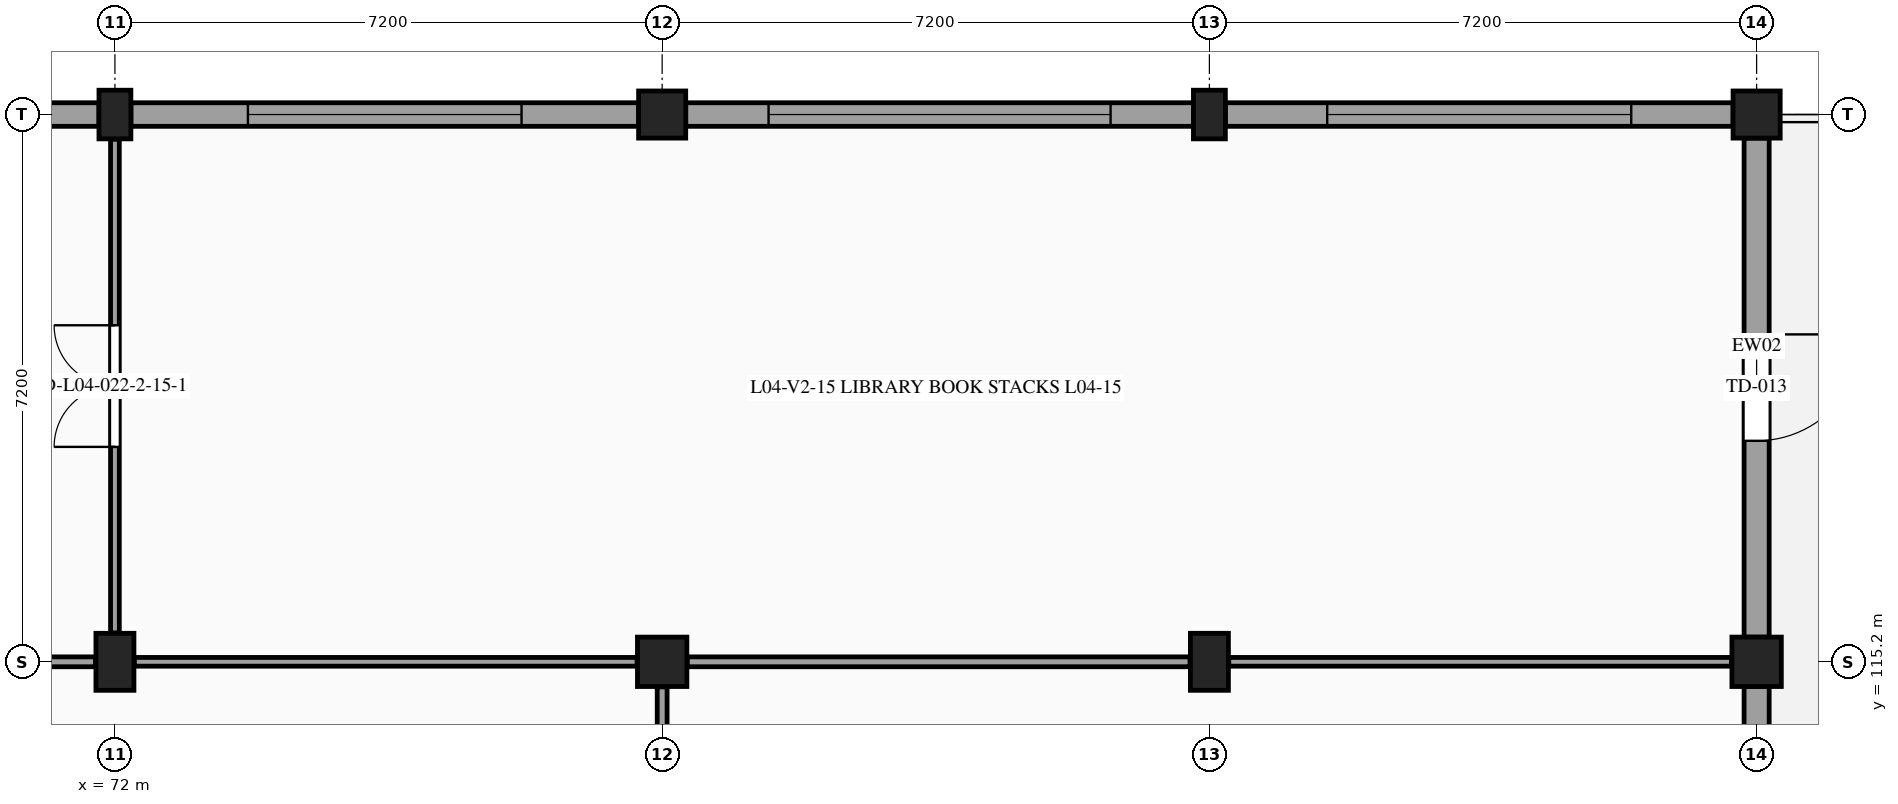
"""IFC4 building model, lengths in metres.
Left out: names, types, materials, properties, quantities, classifications, styles, units other than length and angle.
Written with IfcOpenShell. Run it as: python <this file> out.ifc"""

import sys

from ifc_helpers import new_model, si_unit, direction, frame, frame_2d, origin, origin_2d, place, context, subcontext, project, spatial, rectangle, extrude, element, fill, save


model = new_model("IFC4")
c1 = context("Model", 3, precision=1e-05, world=origin(), true_north=direction((0.0, 1.0)))
c2 = subcontext(c1, "Body", "Model", "MODEL_VIEW")
j1 = project(units=[si_unit("LENGTHUNIT", "METRE"), si_unit("PLANEANGLEUNIT", "RADIAN")], contexts=[c1])
p1 = place(None, origin())
s1 = spatial("IfcSite", under=j1, at=p1, CompositionType="ELEMENT")
p2 = place(p1, origin())
s2 = spatial("IfcBuilding", under=s1, at=p2, CompositionType="ELEMENT")
p3 = place(p2, frame((0.0, 0.0, 18.6)))
s3 = spatial("IfcBuildingStorey", under=s2, at=p3, CompositionType="ELEMENT", Elevation=18.6)
p4 = place(p3, frame((72.0, 115.2, 0.0), z_axis=(0.0, 0.0, 1.0), x_axis=(1.0, 0.0, 0.0)))
e1 = element("IfcColumn", 1, at=p4, inside=s3, PredefinedType="COLUMN", context=c2, shape_type="SweptSolid", body=[
    extrude(rectangle(XDim=0.5, YDim=0.75, at=origin_2d()), origin(), (0.0, 0.0, 1.0), 4.2),
])
p5 = place(p3, frame((72.0, 122.4, 0.0), z_axis=(0.0, 0.0, 1.0), x_axis=(1.0, 0.0, 0.0)))
e2 = element("IfcColumn", 2, at=p5, inside=s3, PredefinedType="PILASTER", context=c2, shape_type="SweptSolid", body=[
    extrude(rectangle(XDim=0.42, YDim=0.64, at=origin_2d()), origin(), (0.0, 0.0, 1.0), 4.2),
])
p6 = place(p3, frame((79.2, 115.2, 0.0), z_axis=(0.0, 0.0, 1.0), x_axis=(1.0, 0.0, 0.0)))
e3 = element("IfcColumn", 3, at=p6, inside=s3, PredefinedType="COLUMN", context=c2, shape_type="SweptSolid", body=[
    extrude(rectangle(XDim=0.65, YDim=0.65, at=origin_2d()), origin(), (0.0, 0.0, 1.0), 4.2),
])
p7 = place(p3, frame((79.2, 122.4, 0.0), z_axis=(0.0, 0.0, 1.0), x_axis=(1.0, 0.0, 0.0)))
e4 = element("IfcColumn", 4, at=p7, inside=s3, PredefinedType="COLUMN", context=c2, shape_type="SweptSolid", body=[
    extrude(rectangle(XDim=0.62, YDim=0.62, at=origin_2d()), origin(), (0.0, 0.0, 1.0), 4.2),
])
p8 = place(p3, frame((86.4, 115.2, 0.0), z_axis=(0.0, 0.0, 1.0), x_axis=(1.0, 0.0, 0.0)))
e5 = element("IfcColumn", 5, at=p8, inside=s3, PredefinedType="COLUMN", context=c2, shape_type="SweptSolid", body=[
    extrude(rectangle(XDim=0.5, YDim=0.75, at=origin_2d()), origin(), (0.0, 0.0, 1.0), 4.2),
])
p9 = place(p3, frame((86.4, 122.4, 0.0), z_axis=(0.0, 0.0, 1.0), x_axis=(1.0, 0.0, 0.0)))
e6 = element("IfcColumn", 6, at=p9, inside=s3, PredefinedType="PILASTER", context=c2, shape_type="SweptSolid", body=[
    extrude(rectangle(XDim=0.42, YDim=0.64, at=origin_2d()), origin(), (0.0, 0.0, 1.0), 4.2),
])
p10 = place(p3, frame((93.6, 115.2, 0.0), z_axis=(0.0, 0.0, 1.0), x_axis=(1.0, 0.0, 0.0)))
e7 = element("IfcColumn", 7, at=p10, inside=s3, PredefinedType="COLUMN", context=c2, shape_type="SweptSolid", body=[
    extrude(rectangle(XDim=0.65, YDim=0.65, at=origin_2d()), origin(), (0.0, 0.0, 1.0), 4.2),
])
p11 = place(p3, frame((93.6, 122.4, 0.0), z_axis=(0.0, 0.0, 1.0), x_axis=(1.0, 0.0, 0.0)))
e8 = element("IfcColumn", 8, at=p11, inside=s3, PredefinedType="COLUMN", context=c2, shape_type="SweptSolid", body=[
    extrude(rectangle(XDim=0.62, YDim=0.62, at=origin_2d()), origin(), (0.0, 0.0, 1.0), 4.2),
])
p12 = place(p3, frame((65.11, 122.4, 0.0), z_axis=(0.0, 0.0, 1.0), x_axis=(1.0, 0.0, 0.0)))
e9 = element("IfcWall", 9, at=p12, inside=s3, PredefinedType="STANDARD", context=c2, shape_type="SweptSolid", body=[
    extrude(rectangle(XDim=6.68, YDim=0.31, at=frame_2d((3.34, 0.0))), origin(), (0.0, 0.0, 1.0), 3.2),
])
p13 = place(p12, frame((0.94, 0.0, 0.98)))
e10 = element("IfcOpeningElement", 10, at=p13, cuts=e9, PredefinedType="OPENING", context=c2, shape_type="SweptSolid", body=[
    extrude(rectangle(XDim=4.8, YDim=1.8, at=frame_2d((2.4, 0.9))), frame((0.0, 0.165, 0.0), z_axis=(0.0, -1.0, 0.0), x_axis=(1.0, 0.0, 0.0)), (0.0, 0.0, 1.0), 0.33),
])
p14 = place(p3, frame((72.21, 122.4, 0.0), z_axis=(0.0, 0.0, 1.0), x_axis=(1.0, 0.0, 0.0)))
e11 = element("IfcWall", 11, at=p14, inside=s3, PredefinedType="STANDARD", context=c2, shape_type="SweptSolid", body=[
    extrude(rectangle(XDim=6.68, YDim=0.31, at=frame_2d((3.34, 0.0))), origin(), (0.0, 0.0, 1.0), 3.18),
])
p15 = place(p14, frame((1.54, 0.0, 0.98)))
e12 = element("IfcOpeningElement", 12, at=p15, cuts=e11, PredefinedType="OPENING", context=c2, shape_type="SweptSolid", body=[
    extrude(rectangle(XDim=3.6, YDim=1.8, at=frame_2d((1.8, 0.9))), frame((0.0, 0.165, 0.0), z_axis=(0.0, -1.0, 0.0), x_axis=(1.0, 0.0, 0.0)), (0.0, 0.0, 1.0), 0.33),
])
p16 = place(p3, frame((79.51, 122.4, 0.0), z_axis=(0.0, 0.0, 1.0), x_axis=(1.0, 0.0, 0.0)))
e13 = element("IfcWall", 13, at=p16, inside=s3, PredefinedType="STANDARD", context=c2, shape_type="SweptSolid", body=[
    extrude(rectangle(XDim=6.68, YDim=0.31, at=frame_2d((3.34, 0.0))), origin(), (0.0, 0.0, 1.0), 3.18),
])
p17 = place(p16, frame((1.09, 0.0, 0.98)))
e14 = element("IfcOpeningElement", 14, at=p17, cuts=e13, PredefinedType="OPENING", context=c2, shape_type="SweptSolid", body=[
    extrude(rectangle(XDim=4.5, YDim=1.55, at=frame_2d((2.25, 0.775))), frame((0.0, 0.165, 0.0), z_axis=(0.0, -1.0, 0.0), x_axis=(1.0, 0.0, 0.0)), (0.0, 0.0, 1.0), 0.33),
])
p18 = place(p3, frame((86.61, 122.4, 0.0), z_axis=(0.0, 0.0, 1.0), x_axis=(1.0, 0.0, 0.0)))
e15 = element("IfcWall", 15, at=p18, inside=s3, PredefinedType="STANDARD", context=c2, shape_type="SweptSolid", body=[
    extrude(rectangle(XDim=6.68, YDim=0.31, at=frame_2d((3.34, 0.0))), origin(), (0.0, 0.0, 1.0), 3.18),
])
p19 = place(p18, frame((1.34, 0.0, 0.98)))
e16 = element("IfcOpeningElement", 16, at=p19, cuts=e15, PredefinedType="OPENING", context=c2, shape_type="SweptSolid", body=[
    extrude(rectangle(XDim=4.0, YDim=1.55, at=frame_2d((2.0, 0.775))), frame((0.0, 0.165, 0.0), z_axis=(0.0, -1.0, 0.0), x_axis=(1.0, 0.0, 0.0)), (0.0, 0.0, 1.0), 0.33),
])
p20 = place(p3, frame((93.6, 122.09, 0.0), z_axis=(0.0, 0.0, 1.0), x_axis=(0.0, -1.0, 0.0)))
e17 = element("IfcWall", 17, at=p20, inside=s3, PredefinedType="STANDARD", context=c2, shape_type="SweptSolid", body=[
    extrude(rectangle(XDim=6.565, YDim=0.33, at=frame_2d((3.283, 0.0))), origin(), (0.0, 0.0, 1.0), 3.13),
])
p21 = place(p20, frame((2.583, 0.0, 0.0)))
e18 = element("IfcOpeningElement", 18, at=p21, cuts=e17, PredefinedType="OPENING", context=c2, shape_type="SweptSolid", body=[
    extrude(rectangle(XDim=1.4, YDim=2.25, at=frame_2d((0.7, 1.125))), frame((0.0, 0.175, 0.0), z_axis=(0.0, -1.0, 0.0), x_axis=(1.0, 0.0, 0.0)), (0.0, 0.0, 1.0), 0.35),
])
p22 = place(p3, frame((93.6, 114.875, 0.0), z_axis=(0.0, 0.0, 1.0), x_axis=(0.0, -1.0, 0.0)))
e19 = element("IfcWall", 19, at=p22, inside=s3, PredefinedType="STANDARD", context=c2, shape_type="SweptSolid", body=[
    extrude(rectangle(XDim=6.535, YDim=0.33, at=frame_2d((3.268, 0.0))), origin(), (0.0, 0.0, 1.0), 3.13),
])
p23 = place(p22, frame((2.718, 0.0, 0.0)))
e20 = element("IfcOpeningElement", 20, at=p23, cuts=e19, PredefinedType="OPENING", context=c2, shape_type="SweptSolid", body=[
    extrude(rectangle(XDim=1.1, YDim=2.2, at=frame_2d((0.55, 1.1))), frame((0.0, 0.175, 0.0), z_axis=(0.0, -1.0, 0.0), x_axis=(1.0, 0.0, 0.0)), (0.0, 0.0, 1.0), 0.35),
])
p24 = place(p3, frame((65.13, 115.2, 0.0), z_axis=(0.0, 0.0, 1.0), x_axis=(1.0, 0.0, 0.0)))
e21 = element("IfcWall", 21, at=p24, inside=s3, PredefinedType="PARTITIONING", context=c2, shape_type="SweptSolid", body=[
    extrude(rectangle(XDim=6.615, YDim=0.13, at=frame_2d((3.308, 0.0))), origin(), (0.0, 0.0, 1.0), 3.23),
])
p25 = place(p3, frame((72.0, 115.58, 0.0), z_axis=(0.0, 0.0, 1.0), x_axis=(0.0, 1.0, 0.0)))
e22 = element("IfcWall", 22, at=p25, inside=s3, PredefinedType="PARTITIONING", context=c2, shape_type="SweptSolid", body=[
    extrude(rectangle(XDim=6.495, YDim=0.115, at=frame_2d((3.248, 0.0))), origin(), (0.0, 0.0, 1.0), 3.305),
])
p26 = place(p25, frame((2.448, 0.0, 0.0)))
e23 = element("IfcOpeningElement", 23, at=p26, cuts=e22, PredefinedType="OPENING", context=c2, shape_type="SweptSolid", body=[
    extrude(rectangle(XDim=1.6, YDim=2.2, at=frame_2d((0.8, 1.1))), frame((0.0, 0.067, 0.0), z_axis=(0.0, -1.0, 0.0), x_axis=(1.0, 0.0, 0.0)), (0.0, 0.0, 1.0), 0.135),
])
p27 = place(p3, frame((79.2, 108.345, 0.0), z_axis=(0.0, 0.0, 1.0), x_axis=(0.0, 1.0, 0.0)))
e24 = element("IfcWall", 24, at=p27, inside=s3, PredefinedType="PARTITIONING", context=c2, shape_type="SweptSolid", body=[
    extrude(rectangle(XDim=6.525, YDim=0.13, at=frame_2d((3.263, 0.0))), origin(), (0.0, 0.0, 1.0), 3.24),
])
p28 = place(p27, frame((2.788, 0.0, 0.0)))
e25 = element("IfcOpeningElement", 25, at=p28, cuts=e24, PredefinedType="OPENING", context=c2, shape_type="SweptSolid", body=[
    extrude(rectangle(XDim=0.95, YDim=2.15, at=frame_2d((0.475, 1.075))), frame((0.0, 0.075, 0.0), z_axis=(0.0, -1.0, 0.0), x_axis=(1.0, 0.0, 0.0)), (0.0, 0.0, 1.0), 0.15),
])
p29 = place(p3, frame((72.255, 115.2, 0.0), z_axis=(0.0, 0.0, 1.0), x_axis=(1.0, 0.0, 0.0)))
e26 = element("IfcWall", 26, at=p29, inside=s3, PredefinedType="PARTITIONING", context=c2, shape_type="SweptSolid", body=[
    extrude(rectangle(XDim=6.615, YDim=0.115, at=frame_2d((3.308, 0.0))), origin(), (0.0, 0.0, 1.0), 3.215),
])
p30 = place(p3, frame((79.53, 115.2, 0.0), z_axis=(0.0, 0.0, 1.0), x_axis=(1.0, 0.0, 0.0)))
e27 = element("IfcWall", 27, at=p30, inside=s3, PredefinedType="PARTITIONING", context=c2, shape_type="SweptSolid", body=[
    extrude(rectangle(XDim=6.615, YDim=0.13, at=frame_2d((3.308, 0.0))), origin(), (0.0, 0.0, 1.0), 3.235),
])
p31 = place(p3, frame((86.655, 115.2, 0.0), z_axis=(0.0, 0.0, 1.0), x_axis=(1.0, 0.0, 0.0)))
e28 = element("IfcWall", 28, at=p31, inside=s3, PredefinedType="PARTITIONING", context=c2, shape_type="SweptSolid", body=[
    extrude(rectangle(XDim=6.615, YDim=0.115, at=frame_2d((3.308, 0.0))), origin(), (0.0, 0.0, 1.0), 3.275),
])
p32 = place(p15, origin())
e29 = element("IfcWindow", 29, at=p32, inside=s3, PartitioningType="SINGLE_PANEL", PredefinedType="WINDOW", context=c2, shape_type="SweptSolid", body=[
    extrude(rectangle(XDim=3.6, YDim=1.8, at=frame_2d((1.8, 0.9))), frame((0.0, -0.03, 0.0), z_axis=(0.0, -1.0, 0.0), x_axis=(1.0, 0.0, 0.0)), (0.0, 0.0, 1.0), 0.06),
])
fill(e12, e29)
p33 = place(p17, origin())
e30 = element("IfcWindow", 30, at=p33, inside=s3, PartitioningType="SINGLE_PANEL", PredefinedType="WINDOW", context=c2, shape_type="SweptSolid", body=[
    extrude(rectangle(XDim=4.5, YDim=1.55, at=frame_2d((2.25, 0.775))), frame((0.0, -0.03, 0.0), z_axis=(0.0, -1.0, 0.0), x_axis=(1.0, 0.0, 0.0)), (0.0, 0.0, 1.0), 0.06),
])
fill(e14, e30)
p34 = place(p19, origin())
e31 = element("IfcWindow", 31, at=p34, inside=s3, PartitioningType="SINGLE_PANEL", PredefinedType="WINDOW", context=c2, shape_type="SweptSolid", body=[
    extrude(rectangle(XDim=4.0, YDim=1.55, at=frame_2d((2.0, 0.775))), frame((0.0, -0.03, 0.0), z_axis=(0.0, -1.0, 0.0), x_axis=(1.0, 0.0, 0.0)), (0.0, 0.0, 1.0), 0.06),
])
fill(e16, e31)
p35 = place(p21, origin())
e32 = element("IfcDoor", 32, at=p35, inside=s3, OperationType="SINGLE_SWING_LEFT", PredefinedType="DOOR", context=c2, shape_type="SweptSolid", body=[
    extrude(rectangle(XDim=1.4, YDim=2.25, at=frame_2d((0.7, 1.125))), frame((0.0, 0.025, 0.0), z_axis=(0.0, -1.0, 0.0), x_axis=(1.0, 0.0, 0.0)), (0.0, 0.0, 1.0), 0.05),
])
fill(e18, e32)
p36 = place(p26, origin())
e33 = element("IfcDoor", 33, at=p36, inside=s3, OperationType="DOUBLE_DOOR_SINGLE_SWING", PredefinedType="DOOR", context=c2, shape_type="SweptSolid", body=[
    extrude(rectangle(XDim=1.6, YDim=2.2, at=frame_2d((0.8, 1.1))), frame((0.0, 0.025, 0.0), z_axis=(0.0, -1.0, 0.0), x_axis=(1.0, 0.0, 0.0)), (0.0, 0.0, 1.0), 0.05),
])
fill(e23, e33)
save(model, sys.argv[1])
